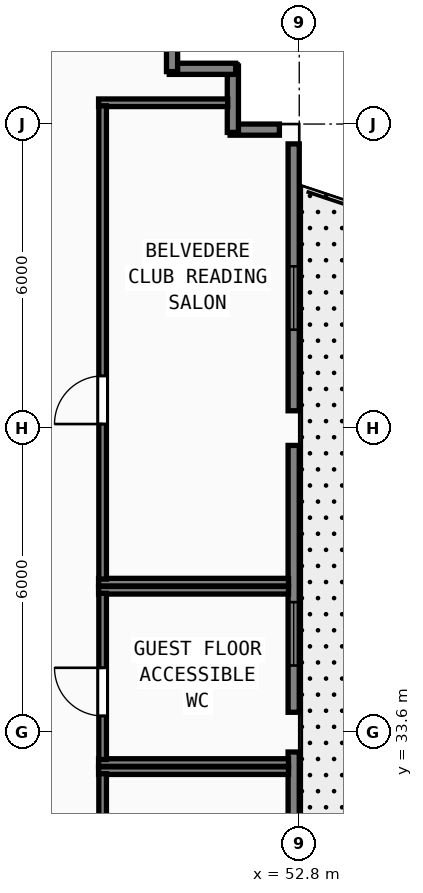
"""IFC4 building model, lengths in metres.
Left out: names, types, materials, properties, quantities, classifications, styles, units other than length and angle.
Written with IfcOpenShell. Run it as: python <this file> out.ifc"""

import sys

from ifc_helpers import new_model, si_unit, direction, frame, frame_2d, origin, origin_2d, place, context, subcontext, project, spatial, rectangle, hollow_rectangle, extrude, element, fill, save


model = new_model("IFC4")
c1 = context("Model", 3, precision=1e-05, world=origin(), true_north=direction((0.0, 1.0)))
c2 = subcontext(c1, "Body", "Model", "MODEL_VIEW")
j1 = project(units=[si_unit("LENGTHUNIT", "METRE"), si_unit("PLANEANGLEUNIT", "RADIAN")], contexts=[c1])
p1 = place(None, origin())
s1 = spatial("IfcSite", under=j1, at=p1, CompositionType="ELEMENT")
p2 = place(p1, origin())
s2 = spatial("IfcBuilding", under=s1, at=p2, CompositionType="ELEMENT")
p3 = place(p2, frame((0.0, 0.0, 235.2)))
s3 = spatial("IfcBuildingStorey", under=s2, at=p3, CompositionType="ELEMENT", Elevation=235.2)
for number, where, z_axis, x_axis in (
    (1, (52.8, 33.6, 0.0), (0.0, 0.0, 1.0), (1.0, 0.0, 0.0)),
    (2, (52.8, 45.6, 0.0), (0.0, 0.0, 1.0), (1.0, 0.0, 0.0)),
):
    element("IfcColumn", number, at=place(p3, frame(where, z_axis=z_axis, x_axis=x_axis)), inside=s3, PredefinedType="COLUMN", context=c2, shape_type="SweptSolid", body=[
        extrude(hollow_rectangle(XDim=0.8, YDim=0.8, WallThickness=0.03, at=origin_2d()), origin(), (0.0, 0.0, 1.0), 3.85),
    ])
p4 = place(p3, frame((52.8, 39.6, 0.0), z_axis=(0.0, 0.0, 1.0), x_axis=(1.0, 0.0, 0.0)))
e3 = element("IfcColumn", 3, at=p4, inside=s3, PredefinedType="COLUMN", context=c2, shape_type="SweptSolid", body=[
    extrude(hollow_rectangle(XDim=0.7, YDim=0.7, WallThickness=0.026, at=origin_2d()), origin(), (0.0, 0.0, 1.0), 3.85),
])
p5 = place(p3, frame((52.69, 27.942, 0.0), z_axis=(0.0, 0.0, 1.0), x_axis=(0.0, 1.0, 0.0)))
e4 = element("IfcWall", 4, at=p5, inside=s3, PredefinedType="SOLIDWALL", context=c2, shape_type="SweptSolid", body=[
    extrude(rectangle(XDim=5.266, YDim=0.22, at=frame_2d((2.633, 0.0))), origin(), (0.0, 0.0, 1.0), 3.315),
])
p6 = place(p5, frame((1.6, 0.0, 0.85)))
e5 = element("IfcOpeningElement", 5, at=p6, cuts=e4, PredefinedType="OPENING", context=c2, shape_type="SweptSolid", body=[
    extrude(rectangle(XDim=1.25, YDim=1.95, at=frame_2d((0.625, 0.975))), frame((0.0, 0.12, 0.0), z_axis=(0.0, -1.0, 0.0), x_axis=(1.0, 0.0, 0.0)), (0.0, 0.0, 1.0), 0.24),
])
p7 = place(p3, frame((52.69, 33.992, 0.0), z_axis=(0.0, 0.0, 1.0), x_axis=(0.0, 1.0, 0.0)))
e6 = element("IfcWall", 6, at=p7, inside=s3, PredefinedType="SOLIDWALL", context=c2, shape_type="SweptSolid", body=[
    extrude(rectangle(XDim=5.266, YDim=0.22, at=frame_2d((2.633, 0.0))), origin(), (0.0, 0.0, 1.0), 3.315),
])
p8 = place(p7, frame((0.923, 0.0, 0.85)))
e7 = element("IfcOpeningElement", 7, at=p8, cuts=e6, PredefinedType="OPENING", context=c2, shape_type="SweptSolid", body=[
    extrude(rectangle(XDim=1.25, YDim=1.95, at=frame_2d((0.625, 0.975))), frame((0.0, 0.12, 0.0), z_axis=(0.0, -1.0, 0.0), x_axis=(1.0, 0.0, 0.0)), (0.0, 0.0, 1.0), 0.24),
])
p9 = place(p3, frame((52.69, 39.942, 0.0), z_axis=(0.0, 0.0, 1.0), x_axis=(0.0, 1.0, 0.0)))
e8 = element("IfcWall", 8, at=p9, inside=s3, PredefinedType="SOLIDWALL", context=c2, shape_type="SweptSolid", body=[
    extrude(rectangle(XDim=5.266, YDim=0.22, at=frame_2d((2.633, 0.0))), origin(), (0.0, 0.0, 1.0), 3.315),
])
p10 = place(p9, frame((1.6, 0.0, 0.85)))
e9 = element("IfcOpeningElement", 9, at=p10, cuts=e8, PredefinedType="OPENING", context=c2, shape_type="SweptSolid", body=[
    extrude(rectangle(XDim=1.25, YDim=1.95, at=frame_2d((0.625, 0.975))), frame((0.0, 0.12, 0.0), z_axis=(0.0, -1.0, 0.0), x_axis=(1.0, 0.0, 0.0)), (0.0, 0.0, 1.0), 0.24),
])
p11 = place(p3, frame((52.408, 45.49, 0.0), z_axis=(0.0, 0.0, 1.0), x_axis=(-1.0, 0.0, 0.0)))
e10 = element("IfcWall", 10, at=p11, inside=s3, PredefinedType="SOLIDWALL", context=c2, shape_type="SweptSolid", body=[
    extrude(rectangle(XDim=0.973, YDim=0.22, at=frame_2d((0.486, 0.0))), origin(), (0.0, 0.0, 1.0), 3.67),
])
p12 = place(p3, frame((51.49, 45.435, 0.0), z_axis=(0.0, 0.0, 1.0), x_axis=(0.0, 1.0, 0.0)))
e11 = element("IfcWall", 11, at=p12, inside=s3, PredefinedType="SOLIDWALL", context=c2, shape_type="SweptSolid", body=[
    extrude(rectangle(XDim=1.31, YDim=0.22, at=frame_2d((0.655, 0.0))), origin(), (0.0, 0.0, 1.0), 3.67),
])
p13 = place(p3, frame((51.545, 46.69, 0.0), z_axis=(0.0, 0.0, 1.0), x_axis=(-1.0, 0.0, 0.0)))
e12 = element("IfcWall", 12, at=p13, inside=s3, PredefinedType="SOLIDWALL", context=c2, shape_type="SweptSolid", body=[
    extrude(rectangle(XDim=1.31, YDim=0.22, at=frame_2d((0.655, 0.0))), origin(), (0.0, 0.0, 1.0), 3.67),
])
p14 = place(p3, frame((50.29, 46.635, 0.0), z_axis=(0.0, 0.0, 1.0), x_axis=(0.0, 1.0, 0.0)))
e13 = element("IfcWall", 13, at=p14, inside=s3, PredefinedType="SOLIDWALL", context=c2, shape_type="SweptSolid", body=[
    extrude(rectangle(XDim=1.535, YDim=0.22, at=frame_2d((0.768, 0.0))), origin(), (0.0, 0.0, 1.0), 3.67),
])
for number, where, z_axis, x_axis in (
    (14, (48.84, 36.4, 0.0), (0.0, 0.0, 1.0), (1.0, 0.0, 0.0)),
    (15, (48.84, 33.0, 0.0), (0.0, 0.0, 1.0), (1.0, 0.0, 0.0)),
):
    element("IfcWall", number, at=place(p3, frame(where, z_axis=z_axis, x_axis=x_axis)), inside=s3, PredefinedType="PARTITIONING", context=c2, shape_type="SweptSolid", body=[
        extrude(rectangle(XDim=3.748, YDim=0.15, at=frame_2d((1.874, 0.0))), origin(), (0.0, 0.0, 1.0), 3.67),
    ])
p15 = place(p3, frame((48.92, 33.06, 0.0), z_axis=(0.0, 0.0, 1.0), x_axis=(0.0, 1.0, 0.0)))
e16 = element("IfcWall", 16, at=p15, inside=s3, PredefinedType="PARTITIONING", context=c2, shape_type="SweptSolid", body=[
    extrude(rectangle(XDim=3.28, YDim=0.15, at=frame_2d((1.64, 0.0))), origin(), (0.0, 0.0, 1.0), 3.67),
])
p16 = place(p15, frame((0.86, 0.0, 0.0)))
e17 = element("IfcOpeningElement", 17, at=p16, cuts=e16, PredefinedType="OPENING", context=c2, shape_type="SweptSolid", body=[
    extrude(rectangle(XDim=0.95, YDim=2.12, at=frame_2d((0.475, 1.06))), frame((0.0, 0.085, 0.0), z_axis=(0.0, -1.0, 0.0), x_axis=(1.0, 0.0, 0.0)), (0.0, 0.0, 1.0), 0.17),
])
p17 = place(p3, frame((48.84, 46.02, 0.0), z_axis=(0.0, 0.0, 1.0), x_axis=(1.0, 0.0, 0.0)))
e18 = element("IfcWall", 18, at=p17, inside=s3, PredefinedType="PARTITIONING", context=c2, shape_type="SweptSolid", body=[
    extrude(rectangle(XDim=2.548, YDim=0.15, at=frame_2d((1.274, 0.0))), origin(), (0.0, 0.0, 1.0), 3.67),
])
p18 = place(p3, frame((48.84, 36.56, 0.0), z_axis=(0.0, 0.0, 1.0), x_axis=(1.0, 0.0, 0.0)))
e19 = element("IfcWall", 19, at=p18, inside=s3, PredefinedType="PARTITIONING", context=c2, shape_type="SweptSolid", body=[
    extrude(rectangle(XDim=3.748, YDim=0.15, at=frame_2d((1.874, 0.0))), origin(), (0.0, 0.0, 1.0), 3.67),
])
p19 = place(p3, frame((48.92, 36.62, 0.0), z_axis=(0.0, 0.0, 1.0), x_axis=(0.0, 1.0, 0.0)))
e20 = element("IfcWall", 20, at=p19, inside=s3, PredefinedType="PARTITIONING", context=c2, shape_type="SweptSolid", body=[
    extrude(rectangle(XDim=9.34, YDim=0.15, at=frame_2d((4.67, 0.0))), origin(), (0.0, 0.0, 1.0), 3.67),
])
p20 = place(p19, frame((3.06, 0.0, 0.0)))
e21 = element("IfcOpeningElement", 21, at=p20, cuts=e20, PredefinedType="OPENING", context=c2, shape_type="SweptSolid", body=[
    extrude(rectangle(XDim=0.95, YDim=2.12, at=frame_2d((0.475, 1.06))), frame((0.0, 0.085, 0.0), z_axis=(0.0, -1.0, 0.0), x_axis=(1.0, 0.0, 0.0)), (0.0, 0.0, 1.0), 0.17),
])
p21 = place(p3, frame((48.84, 32.84, 0.0), z_axis=(0.0, 0.0, 1.0), x_axis=(1.0, 0.0, 0.0)))
e22 = element("IfcWall", 22, at=p21, inside=s3, PredefinedType="PARTITIONING", context=c2, shape_type="SweptSolid", body=[
    extrude(rectangle(XDim=3.748, YDim=0.15, at=frame_2d((1.874, 0.0))), origin(), (0.0, 0.0, 1.0), 3.67),
])
p22 = place(p3, frame((48.92, 26.41, 0.0), z_axis=(0.0, 0.0, 1.0), x_axis=(0.0, 1.0, 0.0)))
e23 = element("IfcWall", 23, at=p22, inside=s3, PredefinedType="PARTITIONING", context=c2, shape_type="SweptSolid", body=[
    extrude(rectangle(XDim=6.37, YDim=0.15, at=frame_2d((3.185, 0.0))), origin(), (0.0, 0.0, 1.0), 3.67),
])
p23 = place(p22, frame((0.86, 0.0, 0.0)))
e24 = element("IfcOpeningElement", 24, at=p23, cuts=e23, PredefinedType="OPENING", context=c2, shape_type="SweptSolid", body=[
    extrude(rectangle(XDim=0.95, YDim=2.12, at=frame_2d((0.475, 1.06))), frame((0.0, 0.085, 0.0), z_axis=(0.0, -1.0, 0.0), x_axis=(1.0, 0.0, 0.0)), (0.0, 0.0, 1.0), 0.17),
])
p24 = place(p8, origin())
e25 = element("IfcWindow", 25, at=p24, inside=s3, PartitioningType="SINGLE_PANEL", PredefinedType="WINDOW", context=c2, shape_type="SweptSolid", body=[
    extrude(rectangle(XDim=1.25, YDim=1.95, at=frame_2d((0.625, 0.975))), frame((0.0, 0.03, 0.0), z_axis=(0.0, -1.0, 0.0), x_axis=(1.0, 0.0, 0.0)), (0.0, 0.0, 1.0), 0.06),
])
fill(e7, e25)
p25 = place(p10, origin())
e26 = element("IfcWindow", 26, at=p25, inside=s3, PartitioningType="SINGLE_PANEL", PredefinedType="WINDOW", context=c2, shape_type="SweptSolid", body=[
    extrude(rectangle(XDim=1.25, YDim=1.95, at=frame_2d((0.625, 0.975))), frame((0.0, 0.03, 0.0), z_axis=(0.0, -1.0, 0.0), x_axis=(1.0, 0.0, 0.0)), (0.0, 0.0, 1.0), 0.06),
])
fill(e9, e26)
p26 = place(p16, origin())
e27 = element("IfcDoor", 27, at=p26, inside=s3, OperationType="SINGLE_SWING_RIGHT", PredefinedType="DOOR", context=c2, shape_type="SweptSolid", body=[
    extrude(rectangle(XDim=0.95, YDim=2.12, at=frame_2d((0.475, 1.06))), frame((0.0, 0.025, 0.0), z_axis=(0.0, -1.0, 0.0), x_axis=(1.0, 0.0, 0.0)), (0.0, 0.0, 1.0), 0.05),
])
fill(e17, e27)
p27 = place(p20, origin())
e28 = element("IfcDoor", 28, at=p27, inside=s3, OperationType="SINGLE_SWING_LEFT", PredefinedType="DOOR", context=c2, shape_type="SweptSolid", body=[
    extrude(rectangle(XDim=0.95, YDim=2.12, at=frame_2d((0.475, 1.06))), frame((0.0, 0.025, 0.0), z_axis=(0.0, -1.0, 0.0), x_axis=(1.0, 0.0, 0.0)), (0.0, 0.0, 1.0), 0.05),
])
fill(e21, e28)
save(model, sys.argv[1])
